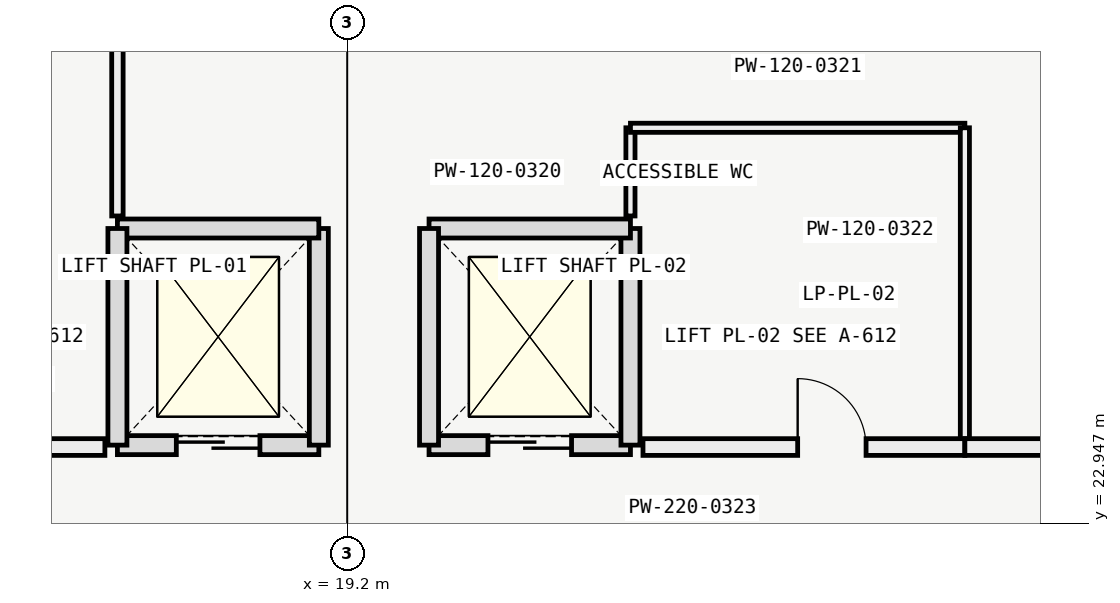
"""IFC4 building model, lengths in metres.
Left out: names, types, materials, properties, quantities, classifications, styles, units other than length and angle.
Written with IfcOpenShell. Run it as: python <this file> out.ifc"""

import sys

from ifc_helpers import new_model, si_unit, direction, frame, frame_2d, origin, place, context, subcontext, project, spatial, rectangle, extrude, element, fill, save


model = new_model("IFC4")
c1 = context("Model", 3, precision=1e-05, world=origin(), true_north=direction((0.0, 1.0)))
c2 = subcontext(c1, "Body", "Model", "MODEL_VIEW")
j1 = project(units=[si_unit("LENGTHUNIT", "METRE"), si_unit("PLANEANGLEUNIT", "RADIAN")], contexts=[c1])
p1 = place(None, origin())
s1 = spatial("IfcSite", under=j1, at=p1, CompositionType="ELEMENT")
p2 = place(p1, origin())
s2 = spatial("IfcBuilding", under=s1, at=p2, CompositionType="ELEMENT")
p3 = place(p2, frame((0.0, 0.0, -4.2)))
s3 = spatial("IfcBuildingStorey", under=s2, at=p3, CompositionType="ELEMENT", Elevation=-4.2)
p4 = place(p3, frame((16.175, 23.975, -0.15), z_axis=(0.0, 0.0, 1.0), x_axis=(1.0, 0.0, 0.0)))
e1 = element("IfcWall", 1, at=p4, inside=s3, PredefinedType="SOLIDWALL", context=c2, shape_type="SweptSolid", body=[
    extrude(rectangle(XDim=2.65, YDim=0.25, at=frame_2d((1.325, 0.0))), origin(), (0.0, 0.0, 1.0), 4.05),
])
p5 = place(p4, frame((0.775, 0.0, 0.15)))
e2 = element("IfcOpeningElement", 2, at=p5, cuts=e1, PredefinedType="OPENING", context=c2, shape_type="SweptSolid", body=[
    extrude(rectangle(XDim=1.1, YDim=2.1, at=frame_2d((0.55, 1.05))), frame((0.0, 0.135, 0.0), z_axis=(0.0, -1.0, 0.0), x_axis=(1.0, 0.0, 0.0)), (0.0, 0.0, 1.0), 0.27),
])
p6 = place(p3, frame((18.825, 23.975, -0.15), z_axis=(0.0, 0.0, 1.0), x_axis=(0.0, 1.0, 0.0)))
e3 = element("IfcWall", 3, at=p6, inside=s3, PredefinedType="SOLIDWALL", context=c2, shape_type="SweptSolid", body=[
    extrude(rectangle(XDim=2.85, YDim=0.25, at=frame_2d((1.425, 0.0))), origin(), (0.0, 0.0, 1.0), 4.05),
])
p7 = place(p3, frame((18.825, 26.825, -0.15), z_axis=(0.0, 0.0, 1.0), x_axis=(-1.0, 0.0, 0.0)))
e4 = element("IfcWall", 4, at=p7, inside=s3, PredefinedType="SOLIDWALL", context=c2, shape_type="SweptSolid", body=[
    extrude(rectangle(XDim=2.65, YDim=0.25, at=frame_2d((1.325, 0.0))), origin(), (0.0, 0.0, 1.0), 4.05),
])
p8 = place(p3, frame((16.175, 26.825, -0.15), z_axis=(0.0, 0.0, 1.0), x_axis=(0.0, -1.0, 0.0)))
e5 = element("IfcWall", 5, at=p8, inside=s3, PredefinedType="SOLIDWALL", context=c2, shape_type="SweptSolid", body=[
    extrude(rectangle(XDim=2.85, YDim=0.25, at=frame_2d((1.425, 0.0))), origin(), (0.0, 0.0, 1.0), 4.05),
])
p9 = place(p3, frame((20.275, 23.975, -0.15), z_axis=(0.0, 0.0, 1.0), x_axis=(1.0, 0.0, 0.0)))
e6 = element("IfcWall", 6, at=p9, inside=s3, PredefinedType="SOLIDWALL", context=c2, shape_type="SweptSolid", body=[
    extrude(rectangle(XDim=2.65, YDim=0.25, at=frame_2d((1.325, 0.0))), origin(), (0.0, 0.0, 1.0), 4.05),
])
p10 = place(p9, frame((0.775, 0.0, 0.15)))
e7 = element("IfcOpeningElement", 7, at=p10, cuts=e6, PredefinedType="OPENING", context=c2, shape_type="SweptSolid", body=[
    extrude(rectangle(XDim=1.1, YDim=2.1, at=frame_2d((0.55, 1.05))), frame((0.0, 0.135, 0.0), z_axis=(0.0, -1.0, 0.0), x_axis=(1.0, 0.0, 0.0)), (0.0, 0.0, 1.0), 0.27),
])
p11 = place(p3, frame((22.925, 23.975, -0.15), z_axis=(0.0, 0.0, 1.0), x_axis=(0.0, 1.0, 0.0)))
e8 = element("IfcWall", 8, at=p11, inside=s3, PredefinedType="SOLIDWALL", context=c2, shape_type="SweptSolid", body=[
    extrude(rectangle(XDim=2.85, YDim=0.25, at=frame_2d((1.425, 0.0))), origin(), (0.0, 0.0, 1.0), 4.05),
])
p12 = place(p3, frame((22.925, 26.825, -0.15), z_axis=(0.0, 0.0, 1.0), x_axis=(-1.0, 0.0, 0.0)))
e9 = element("IfcWall", 9, at=p12, inside=s3, PredefinedType="SOLIDWALL", context=c2, shape_type="SweptSolid", body=[
    extrude(rectangle(XDim=2.65, YDim=0.25, at=frame_2d((1.325, 0.0))), origin(), (0.0, 0.0, 1.0), 4.05),
])
p13 = place(p3, frame((20.275, 26.825, -0.15), z_axis=(0.0, 0.0, 1.0), x_axis=(0.0, -1.0, 0.0)))
e10 = element("IfcWall", 10, at=p13, inside=s3, PredefinedType="SOLIDWALL", context=c2, shape_type="SweptSolid", body=[
    extrude(rectangle(XDim=2.85, YDim=0.25, at=frame_2d((1.425, 0.0))), origin(), (0.0, 0.0, 1.0), 4.05),
])
p14 = place(p3, frame((22.925, 26.99, 0.0), z_axis=(0.0, 0.0, 1.0), x_axis=(0.0, 1.0, 0.0)))
e11 = element("IfcWall", 11, at=p14, inside=s3, PredefinedType="PARTITIONING", context=c2, shape_type="SweptSolid", body=[
    extrude(rectangle(XDim=1.16, YDim=0.12, at=frame_2d((0.58, 0.0))), origin(), (0.0, 0.0, 1.0), 3.85),
])
p15 = place(p3, frame((22.925, 28.15, 0.0), z_axis=(0.0, 0.0, 1.0), x_axis=(1.0, 0.0, 0.0)))
e12 = element("IfcWall", 12, at=p15, inside=s3, PredefinedType="PARTITIONING", context=c2, shape_type="SweptSolid", body=[
    extrude(rectangle(XDim=4.4, YDim=0.12, at=frame_2d((2.2, 0.0))), origin(), (0.0, 0.0, 1.0), 3.85),
])
p16 = place(p3, frame((27.325, 23.95, 0.0), z_axis=(0.0, 0.0, 1.0), x_axis=(0.0, 1.0, 0.0)))
e13 = element("IfcWall", 13, at=p16, inside=s3, PredefinedType="PARTITIONING", context=c2, shape_type="SweptSolid", body=[
    extrude(rectangle(XDim=4.2, YDim=0.12, at=frame_2d((2.1, 0.0))), origin(), (0.0, 0.0, 1.0), 3.85),
])
p17 = place(p3, frame((23.09, 23.95, 0.0), z_axis=(0.0, 0.0, 1.0), x_axis=(1.0, 0.0, 0.0)))
e14 = element("IfcWall", 14, at=p17, inside=s3, PredefinedType="PARTITIONING", context=c2, shape_type="SweptSolid", body=[
    extrude(rectangle(XDim=4.235, YDim=0.22, at=frame_2d((2.117, 0.0))), origin(), (0.0, 0.0, 1.0), 3.85),
])
p18 = place(p17, frame((2.035, 0.0, 0.0)))
e15 = element("IfcOpeningElement", 15, at=p18, cuts=e14, PredefinedType="OPENING", context=c2, shape_type="SweptSolid", body=[
    extrude(rectangle(XDim=0.9, YDim=2.05, at=frame_2d((0.45, 1.025))), frame((0.0, 0.12, 0.0), z_axis=(0.0, -1.0, 0.0), x_axis=(1.0, 0.0, 0.0)), (0.0, 0.0, 1.0), 0.24),
])
p19 = place(p3, frame((16.175, 26.99, 0.0), z_axis=(0.0, 0.0, 1.0), x_axis=(0.0, 1.0, 0.0)))
e16 = element("IfcWall", 16, at=p19, inside=s3, PredefinedType="PARTITIONING", context=c2, shape_type="SweptSolid", body=[
    extrude(rectangle(XDim=13.66, YDim=0.15, at=frame_2d((6.83, 0.0))), origin(), (0.0, 0.0, 1.0), 3.18),
])
p20 = place(p3, frame((0.15, 23.95, 0.0), z_axis=(0.0, 0.0, 1.0), x_axis=(1.0, 0.0, 0.0)))
e17 = element("IfcWall", 17, at=p20, inside=s3, PredefinedType="PARTITIONING", context=c2, shape_type="SweptSolid", body=[
    extrude(rectangle(XDim=15.86, YDim=0.22, at=frame_2d((7.93, 0.0))), origin(), (0.0, 0.0, 1.0), 3.23),
])
p21 = place(p20, frame((6.05, 0.0, 0.0)))
e18 = element("IfcOpeningElement", 18, at=p21, cuts=e17, PredefinedType="OPENING", context=c2, shape_type="SweptSolid", body=[
    extrude(rectangle(XDim=1.5, YDim=2.2, at=frame_2d((0.75, 1.1))), frame((0.0, 0.12, 0.0), z_axis=(0.0, -1.0, 0.0), x_axis=(1.0, 0.0, 0.0)), (0.0, 0.0, 1.0), 0.24),
])
p22 = place(p3, frame((27.325, 23.95, 0.0), z_axis=(0.0, 0.0, 1.0), x_axis=(1.0, 0.0, 0.0)))
e19 = element("IfcWall", 19, at=p22, inside=s3, PredefinedType="PARTITIONING", context=c2, shape_type="SweptSolid", body=[
    extrude(rectangle(XDim=6.985, YDim=0.22, at=frame_2d((3.493, 0.0))), origin(), (0.0, 0.0, 1.0), 3.23),
])
p23 = place(p22, frame((4.1, 0.0, 0.0)))
e20 = element("IfcOpeningElement", 20, at=p23, cuts=e19, PredefinedType="OPENING", context=c2, shape_type="SweptSolid", body=[
    extrude(rectangle(XDim=1.5, YDim=2.2, at=frame_2d((0.75, 1.1))), frame((0.0, 0.12, 0.0), z_axis=(0.0, -1.0, 0.0), x_axis=(1.0, 0.0, 0.0)), (0.0, 0.0, 1.0), 0.24),
])
p24 = place(p5, origin())
e21 = element("IfcDoor", 21, at=p24, inside=s3, OperationType="SLIDING_TO_LEFT", PredefinedType="DOOR", context=c2, shape_type="SweptSolid", body=[
    extrude(rectangle(XDim=1.1, YDim=2.1, at=frame_2d((0.55, 1.05))), frame((0.0, 0.025, 0.0), z_axis=(0.0, -1.0, 0.0), x_axis=(1.0, 0.0, 0.0)), (0.0, 0.0, 1.0), 0.05),
])
fill(e2, e21)
p25 = place(p10, origin())
e22 = element("IfcDoor", 22, at=p25, inside=s3, OperationType="SLIDING_TO_LEFT", PredefinedType="DOOR", context=c2, shape_type="SweptSolid", body=[
    extrude(rectangle(XDim=1.1, YDim=2.1, at=frame_2d((0.55, 1.05))), frame((0.0, 0.025, 0.0), z_axis=(0.0, -1.0, 0.0), x_axis=(1.0, 0.0, 0.0)), (0.0, 0.0, 1.0), 0.05),
])
fill(e7, e22)
p26 = place(p18, origin())
e23 = element("IfcDoor", 23, at=p26, inside=s3, OperationType="SINGLE_SWING_LEFT", PredefinedType="DOOR", context=c2, shape_type="SweptSolid", body=[
    extrude(rectangle(XDim=0.9, YDim=2.05, at=frame_2d((0.45, 1.025))), frame((0.0, 0.025, 0.0), z_axis=(0.0, -1.0, 0.0), x_axis=(1.0, 0.0, 0.0)), (0.0, 0.0, 1.0), 0.05),
])
fill(e15, e23)
save(model, sys.argv[1])
